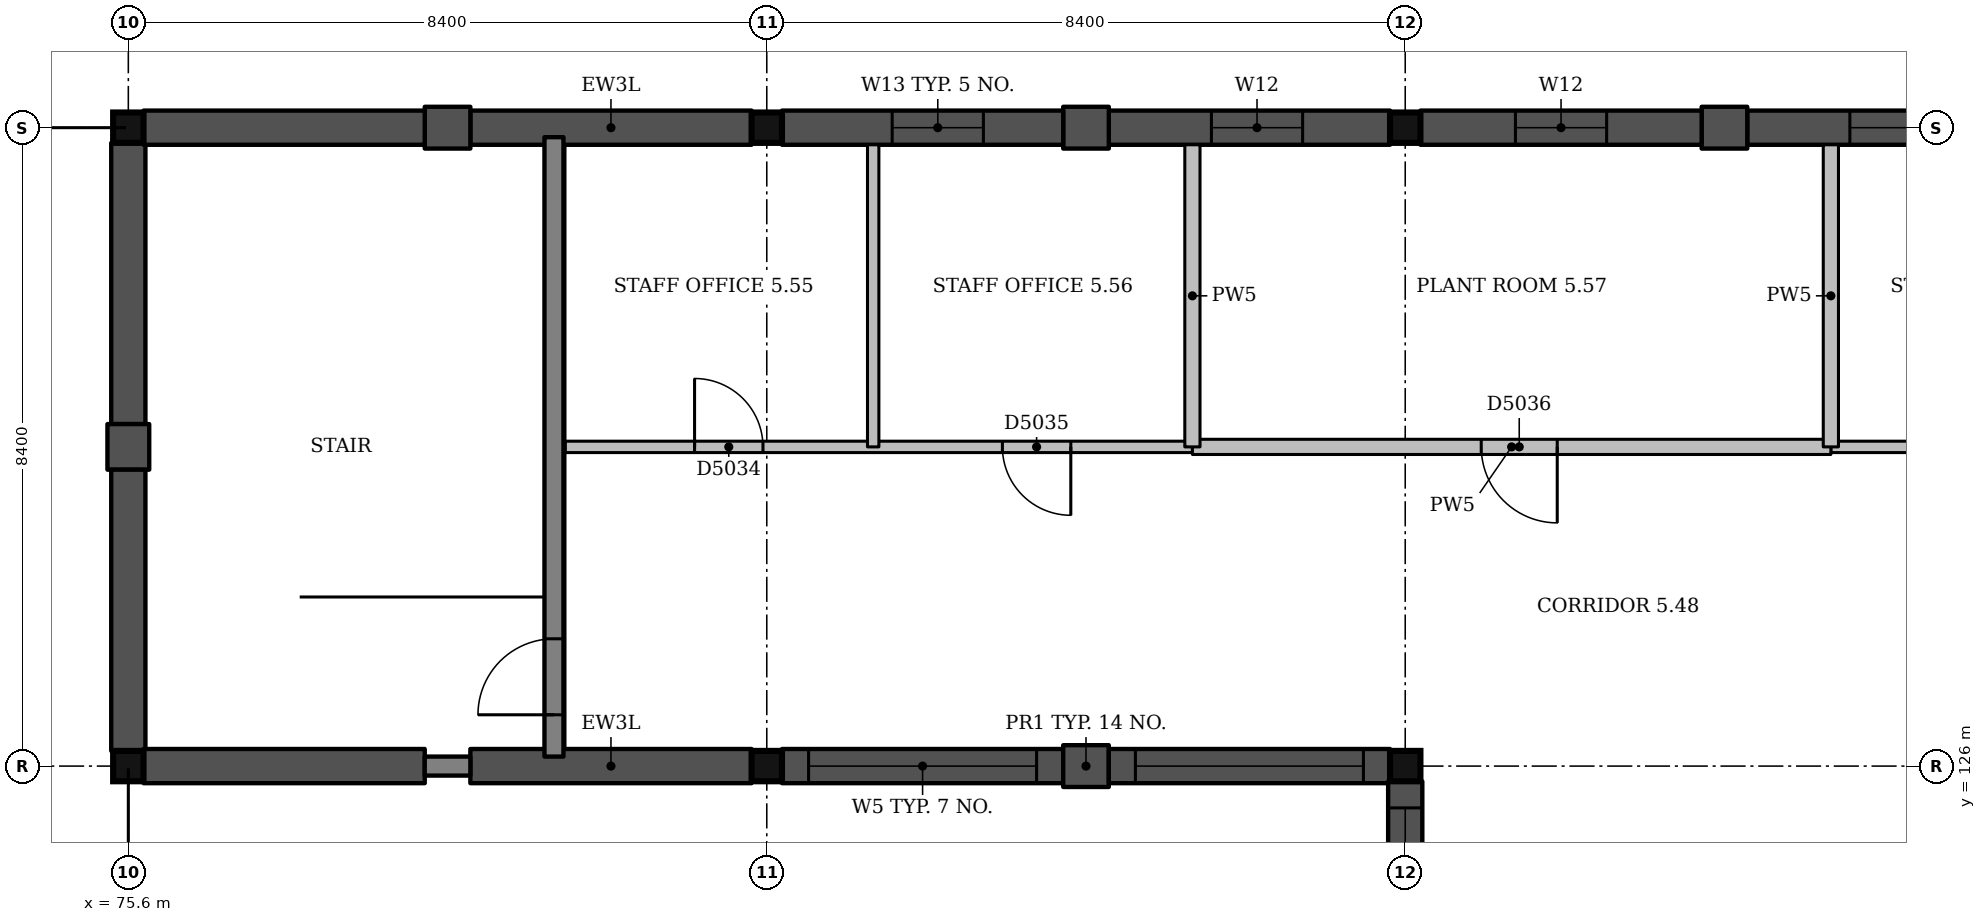
"""IFC4 building model, lengths in metres.
Left out: names, types, materials, properties, quantities, classifications, styles, units other than length and angle.
Written with IfcOpenShell. Run it as: python <this file> out.ifc"""

import sys

from ifc_helpers import new_model, si_unit, direction, frame, frame_2d, origin, origin_2d, place, context, subcontext, project, spatial, rectangle, extrude, element, fill, save


model = new_model("IFC4")
c1 = context("Model", 3, precision=1e-05, world=origin(), true_north=direction((0.0, 1.0)))
c2 = subcontext(c1, "Body", "Model", "MODEL_VIEW")
j1 = project(units=[si_unit("LENGTHUNIT", "METRE"), si_unit("PLANEANGLEUNIT", "RADIAN")], contexts=[c1])
p1 = place(None, origin())
s1 = spatial("IfcSite", under=j1, at=p1, CompositionType="ELEMENT")
p2 = place(p1, origin())
s2 = spatial("IfcBuilding", under=s1, at=p2, CompositionType="ELEMENT")
p3 = place(p2, frame((0.0, 0.0, 22.5)))
s3 = spatial("IfcBuildingStorey", under=s2, at=p3, CompositionType="ELEMENT", Elevation=22.5)
for number, where, z_axis, x_axis in (
    (1, (75.6, 126.0, 0.0), (0.0, 0.0, 1.0), (1.0, 0.0, 0.0)),
    (2, (75.6, 134.4, 0.0), (0.0, 0.0, 1.0), (1.0, 0.0, 0.0)),
    (3, (84.0, 126.0, 0.0), (0.0, 0.0, 1.0), (1.0, 0.0, 0.0)),
    (4, (84.0, 134.4, 0.0), (0.0, 0.0, 1.0), (1.0, 0.0, 0.0)),
    (5, (92.4, 126.0, 0.0), (0.0, 0.0, 1.0), (1.0, 0.0, 0.0)),
    (6, (92.4, 134.4, 0.0), (0.0, 0.0, 1.0), (1.0, 0.0, 0.0)),
):
    element("IfcColumn", number, at=place(p3, frame(where, z_axis=z_axis, x_axis=x_axis)), inside=s3, PredefinedType="COLUMN", context=c2, shape_type="SweptSolid", body=[
        extrude(rectangle(XDim=0.4, YDim=0.4, at=origin_2d()), origin(), (0.0, 0.0, 1.0), 4.5),
    ])
p4 = place(p3, frame((81.2, 126.125, 0.0), z_axis=(0.0, 0.0, 1.0), x_axis=(0.0, 1.0, 0.0)))
e7 = element("IfcWall", 7, at=p4, inside=s3, PredefinedType="SHEAR", context=c2, shape_type="SweptSolid", body=[
    extrude(rectangle(XDim=8.15, YDim=0.25, at=frame_2d((4.075, 0.0))), origin(), (0.0, 0.0, 1.0), 4.2),
])
p5 = place(p4, frame((0.55, 0.0, 0.0)))
e8 = element("IfcOpeningElement", 8, at=p5, cuts=e7, PredefinedType="OPENING", context=c2, shape_type="SweptSolid", body=[
    extrude(rectangle(XDim=1.0, YDim=2.1, at=frame_2d((0.5, 1.05))), frame((0.0, 0.135, 0.0), z_axis=(0.0, -1.0, 0.0), x_axis=(1.0, 0.0, 0.0)), (0.0, 0.0, 1.0), 0.27),
])
p6 = place(p3, frame((75.6, 134.2, 0.0), z_axis=(0.0, 0.0, 1.0), x_axis=(0.0, -1.0, 0.0)))
e9 = element("IfcWall", 9, at=p6, inside=s3, PredefinedType="SOLIDWALL", context=c2, shape_type="SweptSolid", body=[
    extrude(rectangle(XDim=3.7, YDim=0.45, at=frame_2d((1.85, 0.0))), origin(), (0.0, 0.0, 1.0), 4.2),
])
p7 = place(p3, frame((75.6, 130.5, 0.0), z_axis=(0.0, 0.0, 1.0), x_axis=(0.0, -1.0, 0.0)))
e10 = element("IfcWall", 10, at=p7, inside=s3, PredefinedType="SOLIDWALL", context=c2, shape_type="SweptSolid", body=[
    extrude(rectangle(XDim=0.6, YDim=0.55, at=frame_2d((0.3, 0.0))), origin(), (0.0, 0.0, 1.0), 4.2),
])
p8 = place(p3, frame((75.6, 129.9, 0.0), z_axis=(0.0, 0.0, 1.0), x_axis=(0.0, -1.0, 0.0)))
e11 = element("IfcWall", 11, at=p8, inside=s3, PredefinedType="SOLIDWALL", context=c2, shape_type="SweptSolid", body=[
    extrude(rectangle(XDim=3.7, YDim=0.45, at=frame_2d((1.85, 0.0))), origin(), (0.0, 0.0, 1.0), 4.2),
])
for number, where, z_axis, x_axis in (
    (12, (75.8, 126.0, 0.0), (0.0, 0.0, 1.0), (1.0, 0.0, 0.0)),
    (13, (80.1, 126.0, 0.0), (0.0, 0.0, 1.0), (1.0, 0.0, 0.0)),
):
    element("IfcWall", number, at=place(p3, frame(where, z_axis=z_axis, x_axis=x_axis)), inside=s3, PredefinedType="SOLIDWALL", context=c2, shape_type="SweptSolid", body=[
        extrude(rectangle(XDim=3.7, YDim=0.45, at=frame_2d((1.85, 0.0))), origin(), (0.0, 0.0, 1.0), 3.6),
    ])
p9 = place(p3, frame((84.2, 126.0, 0.0), z_axis=(0.0, 0.0, 1.0), x_axis=(1.0, 0.0, 0.0)))
e14 = element("IfcWall", 14, at=p9, inside=s3, PredefinedType="SOLIDWALL", context=c2, shape_type="SweptSolid", body=[
    extrude(rectangle(XDim=3.7, YDim=0.45, at=frame_2d((1.85, 0.0))), origin(), (0.0, 0.0, 1.0), 3.6),
])
p10 = place(p9, frame((0.35, 0.0, 0.9)))
e15 = element("IfcOpeningElement", 15, at=p10, cuts=e14, PredefinedType="OPENING", context=c2, shape_type="SweptSolid", body=[
    extrude(rectangle(XDim=3.0, YDim=2.1, at=frame_2d((1.5, 1.05))), frame((0.0, 0.235, 0.0), z_axis=(0.0, -1.0, 0.0), x_axis=(1.0, 0.0, 0.0)), (0.0, 0.0, 1.0), 0.47),
])
p11 = place(p3, frame((87.9, 126.0, 0.0), z_axis=(0.0, 0.0, 1.0), x_axis=(1.0, 0.0, 0.0)))
e16 = element("IfcWall", 16, at=p11, inside=s3, PredefinedType="SOLIDWALL", context=c2, shape_type="SweptSolid", body=[
    extrude(rectangle(XDim=0.6, YDim=0.55, at=frame_2d((0.3, 0.0))), origin(), (0.0, 0.0, 1.0), 3.6),
])
p12 = place(p3, frame((88.5, 126.0, 0.0), z_axis=(0.0, 0.0, 1.0), x_axis=(1.0, 0.0, 0.0)))
e17 = element("IfcWall", 17, at=p12, inside=s3, PredefinedType="SOLIDWALL", context=c2, shape_type="SweptSolid", body=[
    extrude(rectangle(XDim=3.7, YDim=0.45, at=frame_2d((1.85, 0.0))), origin(), (0.0, 0.0, 1.0), 3.6),
])
p13 = place(p12, frame((0.35, 0.0, 0.9)))
e18 = element("IfcOpeningElement", 18, at=p13, cuts=e17, PredefinedType="OPENING", context=c2, shape_type="SweptSolid", body=[
    extrude(rectangle(XDim=3.0, YDim=2.1, at=frame_2d((1.5, 1.05))), frame((0.0, 0.235, 0.0), z_axis=(0.0, -1.0, 0.0), x_axis=(1.0, 0.0, 0.0)), (0.0, 0.0, 1.0), 0.47),
])
p14 = place(p3, frame((92.4, 125.8, 0.0), z_axis=(0.0, 0.0, 1.0), x_axis=(0.0, -1.0, 0.0)))
e19 = element("IfcWall", 19, at=p14, inside=s3, PredefinedType="SOLIDWALL", context=c2, shape_type="SweptSolid", body=[
    extrude(rectangle(XDim=3.7, YDim=0.45, at=frame_2d((1.85, 0.0))), origin(), (0.0, 0.0, 1.0), 3.6),
])
p15 = place(p14, frame((0.35, 0.0, 0.9)))
e20 = element("IfcOpeningElement", 20, at=p15, cuts=e19, PredefinedType="OPENING", context=c2, shape_type="SweptSolid", body=[
    extrude(rectangle(XDim=3.0, YDim=2.1, at=frame_2d((1.5, 1.05))), frame((0.0, 0.235, 0.0), z_axis=(0.0, -1.0, 0.0), x_axis=(1.0, 0.0, 0.0)), (0.0, 0.0, 1.0), 0.47),
])
p16 = place(p3, frame((100.6, 134.4, 0.0), z_axis=(0.0, 0.0, 1.0), x_axis=(-1.0, 0.0, 0.0)))
e21 = element("IfcWall", 21, at=p16, inside=s3, PredefinedType="SOLIDWALL", context=c2, shape_type="SweptSolid", body=[
    extrude(rectangle(XDim=3.7, YDim=0.45, at=frame_2d((1.85, 0.0))), origin(), (0.0, 0.0, 1.0), 3.6),
])
p17 = place(p16, frame((1.15, 0.0, 0.9)))
e22 = element("IfcOpeningElement", 22, at=p17, cuts=e21, PredefinedType="OPENING", context=c2, shape_type="SweptSolid", body=[
    extrude(rectangle(XDim=1.2, YDim=2.1, at=frame_2d((0.6, 1.05))), frame((0.0, 0.235, 0.0), z_axis=(0.0, -1.0, 0.0), x_axis=(1.0, 0.0, 0.0)), (0.0, 0.0, 1.0), 0.47),
])
p18 = place(p3, frame((96.9, 134.4, 0.0), z_axis=(0.0, 0.0, 1.0), x_axis=(-1.0, 0.0, 0.0)))
e23 = element("IfcWall", 23, at=p18, inside=s3, PredefinedType="SOLIDWALL", context=c2, shape_type="SweptSolid", body=[
    extrude(rectangle(XDim=0.6, YDim=0.55, at=frame_2d((0.3, 0.0))), origin(), (0.0, 0.0, 1.0), 3.6),
])
p19 = place(p3, frame((96.3, 134.4, 0.0), z_axis=(0.0, 0.0, 1.0), x_axis=(-1.0, 0.0, 0.0)))
e24 = element("IfcWall", 24, at=p19, inside=s3, PredefinedType="SOLIDWALL", context=c2, shape_type="SweptSolid", body=[
    extrude(rectangle(XDim=3.7, YDim=0.45, at=frame_2d((1.85, 0.0))), origin(), (0.0, 0.0, 1.0), 3.6),
])
p20 = place(p19, frame((1.25, 0.0, 2.4)))
e25 = element("IfcOpeningElement", 25, at=p20, cuts=e24, PredefinedType="OPENING", context=c2, shape_type="SweptSolid", body=[
    extrude(rectangle(XDim=1.2, YDim=0.6, at=frame_2d((0.6, 0.3))), frame((0.0, 0.235, 0.0), z_axis=(0.0, -1.0, 0.0), x_axis=(1.0, 0.0, 0.0)), (0.0, 0.0, 1.0), 0.47),
])
p21 = place(p3, frame((92.2, 134.4, 0.0), z_axis=(0.0, 0.0, 1.0), x_axis=(-1.0, 0.0, 0.0)))
e26 = element("IfcWall", 26, at=p21, inside=s3, PredefinedType="SOLIDWALL", context=c2, shape_type="SweptSolid", body=[
    extrude(rectangle(XDim=3.7, YDim=0.45, at=frame_2d((1.85, 0.0))), origin(), (0.0, 0.0, 1.0), 3.6),
])
p22 = place(p21, frame((1.15, 0.0, 2.4)))
e27 = element("IfcOpeningElement", 27, at=p22, cuts=e26, PredefinedType="OPENING", context=c2, shape_type="SweptSolid", body=[
    extrude(rectangle(XDim=1.2, YDim=0.6, at=frame_2d((0.6, 0.3))), frame((0.0, 0.235, 0.0), z_axis=(0.0, -1.0, 0.0), x_axis=(1.0, 0.0, 0.0)), (0.0, 0.0, 1.0), 0.47),
])
p23 = place(p3, frame((88.5, 134.4, 0.0), z_axis=(0.0, 0.0, 1.0), x_axis=(-1.0, 0.0, 0.0)))
e28 = element("IfcWall", 28, at=p23, inside=s3, PredefinedType="SOLIDWALL", context=c2, shape_type="SweptSolid", body=[
    extrude(rectangle(XDim=0.6, YDim=0.55, at=frame_2d((0.3, 0.0))), origin(), (0.0, 0.0, 1.0), 3.6),
])
p24 = place(p3, frame((87.9, 134.4, 0.0), z_axis=(0.0, 0.0, 1.0), x_axis=(-1.0, 0.0, 0.0)))
e29 = element("IfcWall", 29, at=p24, inside=s3, PredefinedType="SOLIDWALL", context=c2, shape_type="SweptSolid", body=[
    extrude(rectangle(XDim=3.7, YDim=0.45, at=frame_2d((1.85, 0.0))), origin(), (0.0, 0.0, 1.0), 3.6),
])
p25 = place(p24, frame((1.05, 0.0, 0.9)))
e30 = element("IfcOpeningElement", 30, at=p25, cuts=e29, PredefinedType="OPENING", context=c2, shape_type="SweptSolid", body=[
    extrude(rectangle(XDim=1.2, YDim=2.1, at=frame_2d((0.6, 1.05))), frame((0.0, 0.235, 0.0), z_axis=(0.0, -1.0, 0.0), x_axis=(1.0, 0.0, 0.0)), (0.0, 0.0, 1.0), 0.47),
])
p26 = place(p3, frame((83.8, 134.4, 0.0), z_axis=(0.0, 0.0, 1.0), x_axis=(-1.0, 0.0, 0.0)))
e31 = element("IfcWall", 31, at=p26, inside=s3, PredefinedType="SOLIDWALL", context=c2, shape_type="SweptSolid", body=[
    extrude(rectangle(XDim=3.7, YDim=0.45, at=frame_2d((1.85, 0.0))), origin(), (0.0, 0.0, 1.0), 3.6),
])
p27 = place(p3, frame((80.1, 134.4, 0.0), z_axis=(0.0, 0.0, 1.0), x_axis=(-1.0, 0.0, 0.0)))
e32 = element("IfcWall", 32, at=p27, inside=s3, PredefinedType="SOLIDWALL", context=c2, shape_type="SweptSolid", body=[
    extrude(rectangle(XDim=0.6, YDim=0.55, at=frame_2d((0.3, 0.0))), origin(), (0.0, 0.0, 1.0), 3.6),
])
p28 = place(p3, frame((79.5, 134.4, 0.0), z_axis=(0.0, 0.0, 1.0), x_axis=(-1.0, 0.0, 0.0)))
e33 = element("IfcWall", 33, at=p28, inside=s3, PredefinedType="SOLIDWALL", context=c2, shape_type="SweptSolid", body=[
    extrude(rectangle(XDim=3.7, YDim=0.45, at=frame_2d((1.85, 0.0))), origin(), (0.0, 0.0, 1.0), 3.6),
])
p29 = place(p3, frame((81.35, 130.2, 0.0), z_axis=(0.0, 0.0, 1.0), x_axis=(1.0, 0.0, 0.0)))
e34 = element("IfcWall", 34, at=p29, inside=s3, PredefinedType="PARTITIONING", context=c2, shape_type="SweptSolid", body=[
    extrude(rectangle(XDim=8.25, YDim=0.15, at=frame_2d((4.125, 0.0))), origin(), (0.0, 0.0, 1.0), 3.6),
])
p30 = place(p29, frame((1.7, 0.0, 0.0)))
e35 = element("IfcOpeningElement", 35, at=p30, cuts=e34, PredefinedType="OPENING", context=c2, shape_type="SweptSolid", body=[
    extrude(rectangle(XDim=0.9, YDim=2.1, at=frame_2d((0.45, 1.05))), frame((0.0, 0.085, 0.0), z_axis=(0.0, -1.0, 0.0), x_axis=(1.0, 0.0, 0.0)), (0.0, 0.0, 1.0), 0.17),
])
p31 = place(p29, frame((5.75, 0.0, 0.0)))
e36 = element("IfcOpeningElement", 36, at=p31, cuts=e34, PredefinedType="OPENING", context=c2, shape_type="SweptSolid", body=[
    extrude(rectangle(XDim=0.9, YDim=2.1, at=frame_2d((0.45, 1.05))), frame((0.0, 0.085, 0.0), z_axis=(0.0, -1.0, 0.0), x_axis=(1.0, 0.0, 0.0)), (0.0, 0.0, 1.0), 0.17),
])
p32 = place(p3, frame((98.0, 130.2, 0.0), z_axis=(0.0, 0.0, 1.0), x_axis=(1.0, 0.0, 0.0)))
e37 = element("IfcWall", 37, at=p32, inside=s3, PredefinedType="PARTITIONING", context=c2, shape_type="SweptSolid", body=[
    extrude(rectangle(XDim=11.05, YDim=0.15, at=frame_2d((5.525, 0.0))), origin(), (0.0, 0.0, 1.0), 3.6),
])
p33 = place(p32, frame((1.7, 0.0, 0.0)))
e38 = element("IfcOpeningElement", 38, at=p33, cuts=e37, PredefinedType="OPENING", context=c2, shape_type="SweptSolid", body=[
    extrude(rectangle(XDim=0.9, YDim=2.1, at=frame_2d((0.45, 1.05))), frame((0.0, 0.085, 0.0), z_axis=(0.0, -1.0, 0.0), x_axis=(1.0, 0.0, 0.0)), (0.0, 0.0, 1.0), 0.17),
])
p34 = place(p32, frame((5.9, 0.0, 0.0)))
e39 = element("IfcOpeningElement", 39, at=p34, cuts=e37, PredefinedType="OPENING", context=c2, shape_type="SweptSolid", body=[
    extrude(rectangle(XDim=0.9, YDim=2.1, at=frame_2d((0.45, 1.05))), frame((0.0, 0.085, 0.0), z_axis=(0.0, -1.0, 0.0), x_axis=(1.0, 0.0, 0.0)), (0.0, 0.0, 1.0), 0.17),
])
p35 = place(p32, frame((9.4, 0.0, 0.0)))
e40 = element("IfcOpeningElement", 40, at=p35, cuts=e37, PredefinedType="OPENING", context=c2, shape_type="SweptSolid", body=[
    extrude(rectangle(XDim=0.9, YDim=2.1, at=frame_2d((0.45, 1.05))), frame((0.0, 0.085, 0.0), z_axis=(0.0, -1.0, 0.0), x_axis=(1.0, 0.0, 0.0)), (0.0, 0.0, 1.0), 0.17),
])
p36 = place(p3, frame((89.6, 130.2, 0.0), z_axis=(0.0, 0.0, 1.0), x_axis=(1.0, 0.0, 0.0)))
e41 = element("IfcWall", 41, at=p36, inside=s3, PredefinedType="PARTITIONING", context=c2, shape_type="SweptSolid", body=[
    extrude(rectangle(XDim=8.4, YDim=0.2, at=frame_2d((4.2, 0.0))), origin(), (0.0, 0.0, 1.0), 3.6),
])
p37 = place(p36, frame((3.8, 0.0, 0.0)))
e42 = element("IfcOpeningElement", 42, at=p37, cuts=e41, PredefinedType="OPENING", context=c2, shape_type="SweptSolid", body=[
    extrude(rectangle(XDim=1.0, YDim=2.1, at=frame_2d((0.5, 1.05))), frame((0.0, 0.11, 0.0), z_axis=(0.0, -1.0, 0.0), x_axis=(1.0, 0.0, 0.0)), (0.0, 0.0, 1.0), 0.22),
])
p38 = place(p3, frame((85.4, 130.2, 0.0), z_axis=(0.0, 0.0, 1.0), x_axis=(0.0, 1.0, 0.0)))
e43 = element("IfcWall", 43, at=p38, inside=s3, PredefinedType="PARTITIONING", context=c2, shape_type="SweptSolid", body=[
    extrude(rectangle(XDim=3.975, YDim=0.15, at=frame_2d((1.988, 0.0))), origin(), (0.0, 0.0, 1.0), 4.15),
])
for number, where, z_axis, x_axis in (
    (44, (89.6, 130.2, 0.0), (0.0, 0.0, 1.0), (0.0, 1.0, 0.0)),
    (45, (98.0, 130.2, 0.0), (0.0, 0.0, 1.0), (0.0, 1.0, 0.0)),
):
    element("IfcWall", number, at=place(p3, frame(where, z_axis=z_axis, x_axis=x_axis)), inside=s3, PredefinedType="PARTITIONING", context=c2, shape_type="SweptSolid", body=[
        extrude(rectangle(XDim=3.975, YDim=0.2, at=frame_2d((1.988, 0.0))), origin(), (0.0, 0.0, 1.0), 4.15),
    ])
p39 = place(p3, frame((79.5, 126.0, 0.0), z_axis=(0.0, 0.0, 1.0), x_axis=(1.0, 0.0, 0.0)))
e46 = element("IfcWall", 46, at=p39, inside=s3, PredefinedType="SHEAR", context=c2, shape_type="SweptSolid", body=[
    extrude(rectangle(XDim=0.6, YDim=0.25, at=frame_2d((0.3, 0.0))), origin(), (0.0, 0.0, 1.0), 4.2),
])
p40 = place(p10, origin())
e47 = element("IfcWindow", 47, at=p40, inside=s3, PartitioningType="SINGLE_PANEL", PredefinedType="WINDOW", context=c2, shape_type="SweptSolid", body=[
    extrude(rectangle(XDim=3.0, YDim=2.1, at=frame_2d((1.5, 1.05))), frame((0.0, 0.135, 0.0), z_axis=(0.0, -1.0, 0.0), x_axis=(1.0, 0.0, 0.0)), (0.0, 0.0, 1.0), 0.06),
])
fill(e15, e47)
p41 = place(p13, origin())
e48 = element("IfcWindow", 48, at=p41, inside=s3, PartitioningType="SINGLE_PANEL", PredefinedType="WINDOW", context=c2, shape_type="SweptSolid", body=[
    extrude(rectangle(XDim=3.0, YDim=2.1, at=frame_2d((1.5, 1.05))), frame((0.0, 0.135, 0.0), z_axis=(0.0, -1.0, 0.0), x_axis=(1.0, 0.0, 0.0)), (0.0, 0.0, 1.0), 0.06),
])
fill(e18, e48)
p42 = place(p15, origin())
e49 = element("IfcWindow", 49, at=p42, inside=s3, PartitioningType="SINGLE_PANEL", PredefinedType="WINDOW", context=c2, shape_type="SweptSolid", body=[
    extrude(rectangle(XDim=3.0, YDim=2.1, at=frame_2d((1.5, 1.05))), frame((0.0, 0.135, 0.0), z_axis=(0.0, -1.0, 0.0), x_axis=(1.0, 0.0, 0.0)), (0.0, 0.0, 1.0), 0.06),
])
fill(e20, e49)
p43 = place(p17, origin())
e50 = element("IfcWindow", 50, at=p43, inside=s3, PartitioningType="SINGLE_PANEL", PredefinedType="WINDOW", context=c2, shape_type="SweptSolid", body=[
    extrude(rectangle(XDim=1.2, YDim=2.1, at=frame_2d((0.6, 1.05))), frame((0.0, 0.135, 0.0), z_axis=(0.0, -1.0, 0.0), x_axis=(1.0, 0.0, 0.0)), (0.0, 0.0, 1.0), 0.06),
])
fill(e22, e50)
p44 = place(p20, origin())
e51 = element("IfcWindow", 51, at=p44, inside=s3, PartitioningType="SINGLE_PANEL", PredefinedType="WINDOW", context=c2, shape_type="SweptSolid", body=[
    extrude(rectangle(XDim=1.2, YDim=0.6, at=frame_2d((0.6, 0.3))), frame((0.0, 0.135, 0.0), z_axis=(0.0, -1.0, 0.0), x_axis=(1.0, 0.0, 0.0)), (0.0, 0.0, 1.0), 0.06),
])
fill(e25, e51)
p45 = place(p22, origin())
e52 = element("IfcWindow", 52, at=p45, inside=s3, PartitioningType="SINGLE_PANEL", PredefinedType="WINDOW", context=c2, shape_type="SweptSolid", body=[
    extrude(rectangle(XDim=1.2, YDim=0.6, at=frame_2d((0.6, 0.3))), frame((0.0, 0.135, 0.0), z_axis=(0.0, -1.0, 0.0), x_axis=(1.0, 0.0, 0.0)), (0.0, 0.0, 1.0), 0.06),
])
fill(e27, e52)
p46 = place(p25, origin())
e53 = element("IfcWindow", 53, at=p46, inside=s3, PartitioningType="SINGLE_PANEL", PredefinedType="WINDOW", context=c2, shape_type="SweptSolid", body=[
    extrude(rectangle(XDim=1.2, YDim=2.1, at=frame_2d((0.6, 1.05))), frame((0.0, 0.135, 0.0), z_axis=(0.0, -1.0, 0.0), x_axis=(1.0, 0.0, 0.0)), (0.0, 0.0, 1.0), 0.06),
])
fill(e30, e53)
p47 = place(p30, origin())
e54 = element("IfcDoor", 54, at=p47, inside=s3, OperationType="SINGLE_SWING_LEFT", PredefinedType="DOOR", context=c2, shape_type="SweptSolid", body=[
    extrude(rectangle(XDim=0.9, YDim=2.1, at=frame_2d((0.45, 1.05))), frame((0.0, 0.025, 0.0), z_axis=(0.0, -1.0, 0.0), x_axis=(1.0, 0.0, 0.0)), (0.0, 0.0, 1.0), 0.05),
])
fill(e35, e54)
p48 = place(p31, origin())
e55 = element("IfcDoor", 55, at=p48, inside=s3, OperationType="SINGLE_SWING_RIGHT", PredefinedType="DOOR", context=c2, shape_type="SweptSolid", body=[
    extrude(rectangle(XDim=0.9, YDim=2.1, at=frame_2d((0.45, 1.05))), frame((0.0, 0.025, 0.0), z_axis=(0.0, -1.0, 0.0), x_axis=(1.0, 0.0, 0.0)), (0.0, 0.0, 1.0), 0.05),
])
fill(e36, e55)
p49 = place(p37, origin())
e56 = element("IfcDoor", 56, at=p49, inside=s3, OperationType="SINGLE_SWING_RIGHT", PredefinedType="DOOR", context=c2, shape_type="SweptSolid", body=[
    extrude(rectangle(XDim=1.0, YDim=2.1, at=frame_2d((0.5, 1.05))), frame((0.0, 0.025, 0.0), z_axis=(0.0, -1.0, 0.0), x_axis=(1.0, 0.0, 0.0)), (0.0, 0.0, 1.0), 0.05),
])
fill(e42, e56)
p50 = place(p5, origin())
e57 = element("IfcDoor", 57, at=p50, inside=s3, OperationType="SINGLE_SWING_LEFT", PredefinedType="DOOR", context=c2, shape_type="SweptSolid", body=[
    extrude(rectangle(XDim=1.0, YDim=2.1, at=frame_2d((0.5, 1.05))), frame((0.0, 0.025, 0.0), z_axis=(0.0, -1.0, 0.0), x_axis=(1.0, 0.0, 0.0)), (0.0, 0.0, 1.0), 0.05),
])
fill(e8, e57)
save(model, sys.argv[1])
